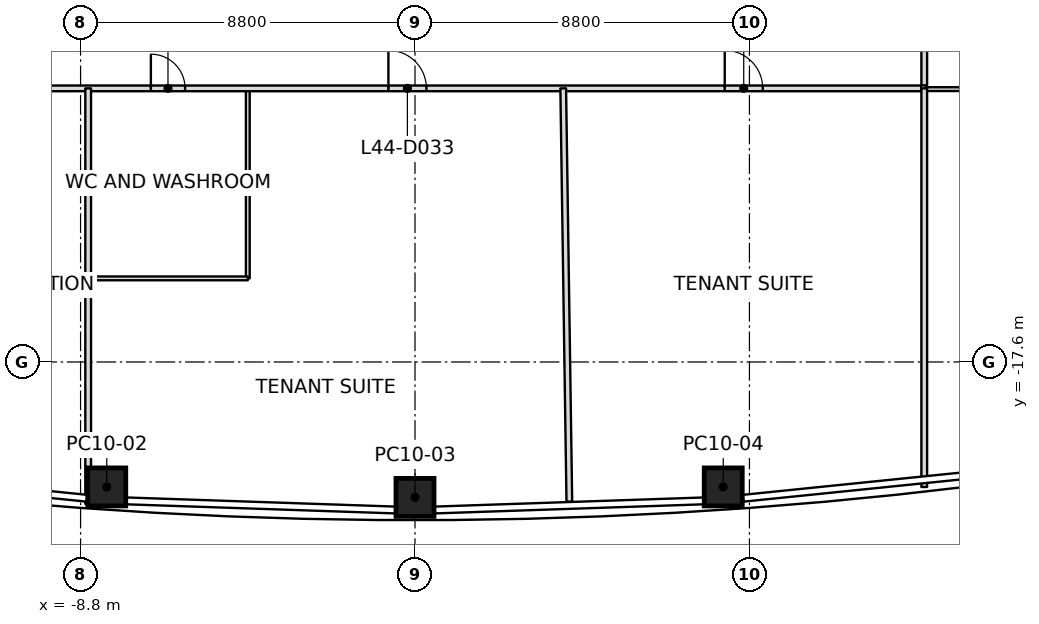
"""IFC4 building model, lengths in metres.
Left out: names, types, materials, properties, quantities, classifications, styles, units other than length and angle.
Written with IfcOpenShell. Run it as: python <this file> out.ifc"""

import sys

from ifc_helpers import new_model, si_unit, direction, frame, frame_2d, origin, origin_2d, place, context, subcontext, project, spatial, rectangle, extrude, element, fill, save


model = new_model("IFC4")
c1 = context("Model", 3, precision=1e-05, world=origin(), true_north=direction((0.0, 1.0)))
c2 = subcontext(c1, "Body", "Model", "MODEL_VIEW")
j1 = project(units=[si_unit("LENGTHUNIT", "METRE"), si_unit("PLANEANGLEUNIT", "RADIAN")], contexts=[c1])
p1 = place(None, origin())
s1 = spatial("IfcSite", under=j1, at=p1, CompositionType="ELEMENT")
p2 = place(p1, origin())
s2 = spatial("IfcBuilding", under=s1, at=p2, CompositionType="ELEMENT")
p3 = place(p2, frame((0.0, 0.0, 197.8)))
s3 = spatial("IfcBuildingStorey", under=s2, at=p3, CompositionType="ELEMENT", Elevation=197.8)
p4 = place(p3, frame((-8.111, -20.888, 0.0), z_axis=(0.008788174922, 0.01116830563, 0.999899013366), x_axis=(-0.997663995961, 0.067840831695, 0.00801078755)))
e1 = element("IfcColumn", 1, at=p4, inside=s3, PredefinedType="COLUMN", context=c2, shape_type="SweptSolid", body=[
    extrude(rectangle(XDim=1.0, YDim=1.0, at=origin_2d()), origin(), (0.0, 0.0, 1.0), 4.0),
])
p5 = place(p3, frame((0.0, -21.163, 0.0), z_axis=(0.0, 0.01141283087, 0.999934871525), x_axis=(1.0, 0.0, 0.0)))
e2 = element("IfcColumn", 2, at=p5, inside=s3, PredefinedType="COLUMN", context=c2, shape_type="SweptSolid", body=[
    extrude(rectangle(XDim=1.0, YDim=1.0, at=origin_2d()), origin(), (0.0, 0.0, 1.0), 4.0),
])
p6 = place(p3, frame((8.111, -20.888, 0.0), z_axis=(-0.008788174922, 0.01116830563, 0.999899013366), x_axis=(0.997663995961, 0.067840831695, 0.00801078755)))
e3 = element("IfcColumn", 3, at=p6, inside=s3, PredefinedType="COLUMN", context=c2, shape_type="SweptSolid", body=[
    extrude(rectangle(XDim=1.0, YDim=1.0, at=origin_2d()), origin(), (0.0, 0.0, 1.0), 4.0),
])
p7 = place(p3, frame((-8.6, -10.4, 0.0), z_axis=(0.0, 0.0, 1.0), x_axis=(0.0, -1.0, 0.0)))
e4 = element("IfcWall", 4, at=p7, inside=s3, PredefinedType="PARTITIONING", context=c2, shape_type="SweptSolid", body=[
    extrude(rectangle(XDim=10.934, YDim=0.15, at=frame_2d((5.467, 0.0))), origin(), (0.0, 0.0, 1.0), 3.234),
])
p8 = place(p3, frame((3.9, -10.4, 0.0), z_axis=(0.0, 0.0, 1.0), x_axis=(0.014814851671, -0.999890254063, 0.0)))
e5 = element("IfcWall", 5, at=p8, inside=s3, PredefinedType="PARTITIONING", context=c2, shape_type="SweptSolid", body=[
    extrude(rectangle(XDim=10.876, YDim=0.15, at=frame_2d((5.438, 0.0))), origin(), (0.0, 0.0, 1.0), 3.234),
])
p9 = place(p3, frame((13.4, -10.4, 0.0), z_axis=(0.0, 0.0, 1.0), x_axis=(0.0, -1.0, 0.0)))
e6 = element("IfcWall", 6, at=p9, inside=s3, PredefinedType="PARTITIONING", context=c2, shape_type="SweptSolid", body=[
    extrude(rectangle(XDim=10.49, YDim=0.15, at=frame_2d((5.245, 0.0))), origin(), (0.0, 0.0, 1.0), 3.234),
])
p10 = place(p3, frame((-13.32, -10.4, 0.0), z_axis=(0.0, 0.0, 1.0), x_axis=(1.0, 0.0, 0.0)))
e7 = element("IfcWall", 7, at=p10, inside=s3, PredefinedType="PARTITIONING", context=c2, shape_type="SweptSolid", body=[
    extrude(rectangle(XDim=26.64, YDim=0.15, at=frame_2d((13.32, 0.0))), origin(), (0.0, 0.0, 1.0), 3.317),
])
p11 = place(p10, frame((1.82, 0.0, 0.0)))
e8 = element("IfcOpeningElement", 8, at=p11, cuts=e7, PredefinedType="OPENING", context=c2, shape_type="SweptSolid", body=[
    extrude(rectangle(XDim=1.0, YDim=2.1, at=frame_2d((0.5, 1.05))), frame((0.0, 0.075, 0.0), z_axis=(0.0, -1.0, 0.0), x_axis=(1.0, 0.0, 0.0)), (0.0, 0.0, 1.0), 0.15),
])
p12 = place(p10, frame((6.37, 0.0, 0.0)))
e9 = element("IfcOpeningElement", 9, at=p12, cuts=e7, PredefinedType="OPENING", context=c2, shape_type="SweptSolid", body=[
    extrude(rectangle(XDim=0.9, YDim=2.1, at=frame_2d((0.45, 1.05))), frame((0.0, 0.075, 0.0), z_axis=(0.0, -1.0, 0.0), x_axis=(1.0, 0.0, 0.0)), (0.0, 0.0, 1.0), 0.15),
])
p13 = place(p10, frame((12.62, 0.0, 0.0)))
e10 = element("IfcOpeningElement", 10, at=p13, cuts=e7, PredefinedType="OPENING", context=c2, shape_type="SweptSolid", body=[
    extrude(rectangle(XDim=1.0, YDim=2.1, at=frame_2d((0.5, 1.05))), frame((0.0, 0.075, 0.0), z_axis=(0.0, -1.0, 0.0), x_axis=(1.0, 0.0, 0.0)), (0.0, 0.0, 1.0), 0.15),
])
p14 = place(p10, frame((21.47, 0.0, 0.0)))
e11 = element("IfcOpeningElement", 11, at=p14, cuts=e7, PredefinedType="OPENING", context=c2, shape_type="SweptSolid", body=[
    extrude(rectangle(XDim=1.0, YDim=2.1, at=frame_2d((0.5, 1.05))), frame((0.0, 0.075, 0.0), z_axis=(0.0, -1.0, 0.0), x_axis=(1.0, 0.0, 0.0)), (0.0, 0.0, 1.0), 0.15),
])
p15 = place(p3, frame((13.4, -10.32, 0.0), z_axis=(0.0, 0.0, 1.0), x_axis=(0.0, 1.0, 0.0)))
e12 = element("IfcWall", 12, at=p15, inside=s3, PredefinedType="PARTITIONING", context=c2, shape_type="SweptSolid", body=[
    extrude(rectangle(XDim=20.64, YDim=0.15, at=frame_2d((10.32, 0.0))), origin(), (0.0, 0.0, 1.0), 3.166),
])
p16 = place(p15, frame((15.47, 0.0, 0.0)))
e13 = element("IfcOpeningElement", 13, at=p16, cuts=e12, PredefinedType="OPENING", context=c2, shape_type="SweptSolid", body=[
    extrude(rectangle(XDim=1.0, YDim=2.1, at=frame_2d((0.5, 1.05))), frame((0.0, 0.075, 0.0), z_axis=(0.0, -1.0, 0.0), x_axis=(1.0, 0.0, 0.0)), (0.0, 0.0, 1.0), 0.15),
])
p17 = place(p15, frame((1.95, 0.0, 0.0)))
e14 = element("IfcOpeningElement", 14, at=p17, cuts=e12, PredefinedType="OPENING", context=c2, shape_type="SweptSolid", body=[
    extrude(rectangle(XDim=0.9, YDim=2.1, at=frame_2d((0.45, 1.05))), frame((0.0, 0.075, 0.0), z_axis=(0.0, -1.0, 0.0), x_axis=(1.0, 0.0, 0.0)), (0.0, 0.0, 1.0), 0.15),
])
p18 = place(p15, frame((7.61, 0.0, 0.0)))
e15 = element("IfcOpeningElement", 15, at=p18, cuts=e12, PredefinedType="OPENING", context=c2, shape_type="SweptSolid", body=[
    extrude(rectangle(XDim=1.0, YDim=2.1, at=frame_2d((0.5, 1.05))), frame((0.0, 0.075, 0.0), z_axis=(0.0, -1.0, 0.0), x_axis=(1.0, 0.0, 0.0)), (0.0, 0.0, 1.0), 0.15),
])
p19 = place(p3, frame((-4.4, -10.43, 0.0), z_axis=(0.0, 0.0, 1.0), x_axis=(0.0, -1.0, 0.0)))
e16 = element("IfcWall", 16, at=p19, inside=s3, PredefinedType="PARTITIONING", context=c2, shape_type="SweptSolid", body=[
    extrude(rectangle(XDim=4.97, YDim=0.1, at=frame_2d((2.485, 0.0))), origin(), (0.0, 0.0, 1.0), 3.45),
])
p20 = place(p3, frame((-4.4, -15.4, 0.0), z_axis=(0.0, 0.0, 1.0), x_axis=(-1.0, 0.0, 0.0)))
e17 = element("IfcWall", 17, at=p20, inside=s3, PredefinedType="PARTITIONING", context=c2, shape_type="SweptSolid", body=[
    extrude(rectangle(XDim=4.17, YDim=0.1, at=frame_2d((2.085, 0.0))), origin(), (0.0, 0.0, 1.0), 3.317),
])
p21 = place(p3, frame((19.4, -10.42, 0.0), z_axis=(0.0, 0.0, 1.0), x_axis=(-1.0, 0.0, 0.0)))
e18 = element("IfcWall", 18, at=p21, inside=s3, PredefinedType="PARTITIONING", context=c2, shape_type="SweptSolid", body=[
    extrude(rectangle(XDim=5.97, YDim=0.1, at=frame_2d((2.985, 0.0))), origin(), (0.0, 0.0, 1.0), 3.166),
])
p22 = place(p12, origin())
e19 = element("IfcDoor", 19, at=p22, inside=s3, OperationType="SINGLE_SWING_RIGHT", PredefinedType="DOOR", context=c2, shape_type="SweptSolid", body=[
    extrude(rectangle(XDim=0.9, YDim=2.1, at=frame_2d((0.45, 1.05))), frame((0.0, 0.025, 0.0), z_axis=(0.0, -1.0, 0.0), x_axis=(1.0, 0.0, 0.0)), (0.0, 0.0, 1.0), 0.05),
])
fill(e9, e19)
p23 = place(p13, origin())
e20 = element("IfcDoor", 20, at=p23, inside=s3, OperationType="SINGLE_SWING_LEFT", PredefinedType="DOOR", context=c2, shape_type="SweptSolid", body=[
    extrude(rectangle(XDim=1.0, YDim=2.1, at=frame_2d((0.5, 1.05))), frame((0.0, 0.025, 0.0), z_axis=(0.0, -1.0, 0.0), x_axis=(1.0, 0.0, 0.0)), (0.0, 0.0, 1.0), 0.05),
])
fill(e10, e20)
p24 = place(p14, origin())
e21 = element("IfcDoor", 21, at=p24, inside=s3, OperationType="SINGLE_SWING_RIGHT", PredefinedType="DOOR", context=c2, shape_type="SweptSolid", body=[
    extrude(rectangle(XDim=1.0, YDim=2.1, at=frame_2d((0.5, 1.05))), frame((0.0, 0.025, 0.0), z_axis=(0.0, -1.0, 0.0), x_axis=(1.0, 0.0, 0.0)), (0.0, 0.0, 1.0), 0.05),
])
fill(e11, e21)
save(model, sys.argv[1])
